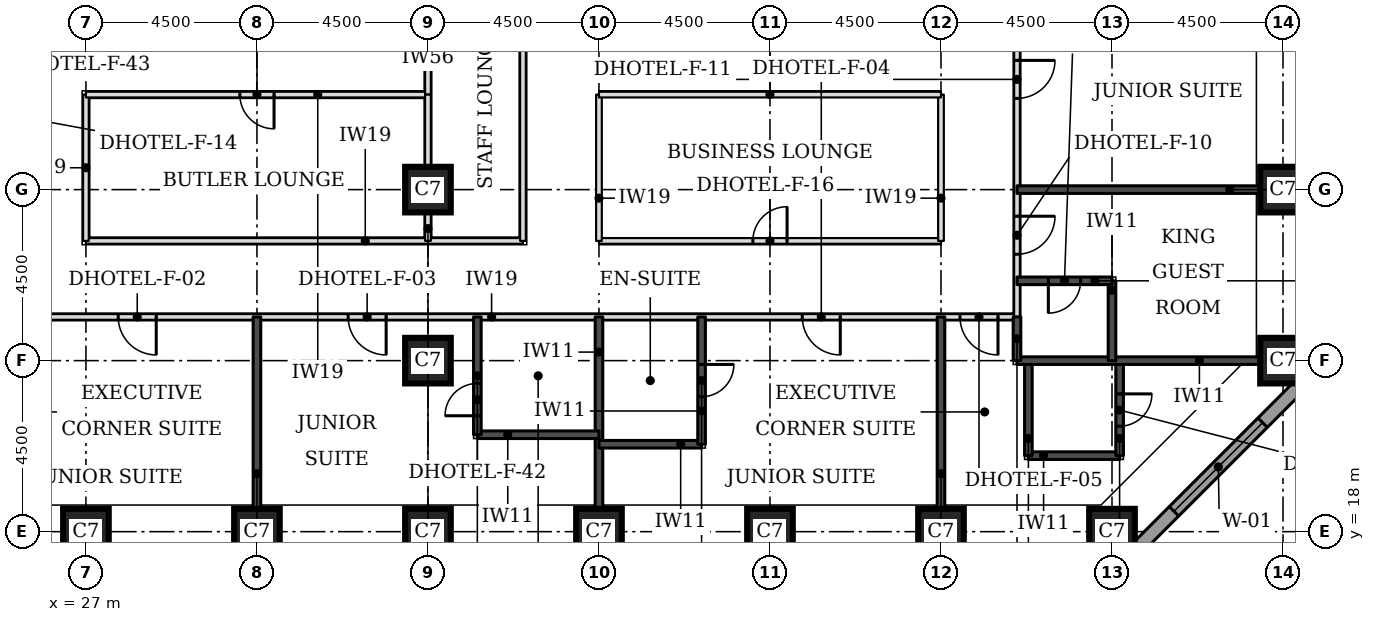
"""IFC4 building model, lengths in metres.
Left out: names, types, materials, properties, quantities, classifications, styles, units other than length and angle.
Written with IfcOpenShell. Run it as: python <this file> out.ifc"""

import sys

from ifc_helpers import new_model, si_unit, direction, frame, frame_2d, origin, origin_2d, place, context, subcontext, project, spatial, rectangle, extrude, element, fill, save


model = new_model("IFC4")
c1 = context("Model", 3, precision=1e-05, world=origin(), true_north=direction((0.0, 1.0)))
c2 = subcontext(c1, "Body", "Model", "MODEL_VIEW")
j1 = project(units=[si_unit("LENGTHUNIT", "METRE"), si_unit("PLANEANGLEUNIT", "RADIAN")], contexts=[c1])
p1 = place(None, origin())
s1 = spatial("IfcSite", under=j1, at=p1, CompositionType="ELEMENT")
p2 = place(p1, origin())
s2 = spatial("IfcBuilding", under=s1, at=p2, CompositionType="ELEMENT")
p3 = place(p2, frame((0.0, 0.0, 42.9)))
s3 = spatial("IfcBuildingStorey", under=s2, at=p3, CompositionType="ELEMENT", Elevation=42.9)
for number, where, z_axis, x_axis in (
    (1, (27.0, 18.0, 0.0), (0.0, 0.0, 1.0), (1.0, 0.0, 0.0)),
    (2, (31.5, 18.0, 0.0), (0.0, 0.0, 1.0), (1.0, 0.0, 0.0)),
    (3, (36.0, 18.0, 0.0), (0.0, 0.0, 1.0), (1.0, 0.0, 0.0)),
    (4, (40.5, 18.0, 0.0), (0.0, 0.0, 1.0), (1.0, 0.0, 0.0)),
    (5, (45.0, 18.0, 0.0), (0.0, 0.0, 1.0), (1.0, 0.0, 0.0)),
    (6, (49.5, 18.0, 0.0), (0.0, 0.0, 1.0), (1.0, 0.0, 0.0)),
    (7, (54.0, 18.0, 0.0), (0.0, 0.0, 1.0), (1.0, 0.0, 0.0)),
    (8, (36.0, 22.5, 0.0), (0.0, 0.0, 1.0), (1.0, 0.0, 0.0)),
    (9, (58.5, 22.5, 0.0), (0.0, 0.0, 1.0), (1.0, 0.0, 0.0)),
    (10, (36.0, 27.0, 0.0), (0.0, 0.0, 1.0), (1.0, 0.0, 0.0)),
    (11, (58.5, 27.0, 0.0), (0.0, 0.0, 1.0), (1.0, 0.0, 0.0)),
):
    element("IfcColumn", number, at=place(p3, frame(where, z_axis=z_axis, x_axis=x_axis)), inside=s3, PredefinedType="COLUMN", context=c2, shape_type="SweptSolid", body=[
        extrude(rectangle(XDim=1.2, YDim=1.2, at=origin_2d()), origin(), (0.0, 0.0, 1.0), 3.3),
    ])
p4 = place(p3, frame((54.27, 17.174, 0.0), z_axis=(0.0, 0.0, 1.0), x_axis=(0.707106781187, 0.707106781187, 0.0)))
e12 = element("IfcWall", 12, at=p4, inside=s3, PredefinedType="STANDARD", context=c2, shape_type="SweptSolid", body=[
    extrude(rectangle(XDim=7.151, YDim=0.35, at=frame_2d((3.576, 0.0))), origin(), (0.0, 0.0, 1.0), 3.055),
])
p5 = place(p4, frame((1.926, 0.0, 0.8)))
e13 = element("IfcOpeningElement", 13, at=p5, cuts=e12, PredefinedType="OPENING", context=c2, shape_type="SweptSolid", body=[
    extrude(rectangle(XDim=3.3, YDim=1.5, at=frame_2d((1.65, 0.75))), frame((0.0, 0.185, 0.0), z_axis=(0.0, -1.0, 0.0), x_axis=(1.0, 0.0, 0.0)), (0.0, 0.0, 1.0), 0.37),
])
p6 = place(p3, frame((20.65, 23.65, 0.0), z_axis=(0.0, 0.0, 1.0), x_axis=(1.0, 0.0, 0.0)))
e14 = element("IfcWall", 14, at=p6, inside=s3, PredefinedType="PARTITIONING", context=c2, shape_type="SweptSolid", body=[
    extrude(rectangle(XDim=30.85, YDim=0.15, at=frame_2d((15.425, 0.0))), origin(), (0.0, 0.0, 1.0), 3.08),
])
p7 = place(p6, frame((7.2, 0.0, 0.0)))
e15 = element("IfcOpeningElement", 15, at=p7, cuts=e14, PredefinedType="OPENING", context=c2, shape_type="SweptSolid", body=[
    extrude(rectangle(XDim=1.0, YDim=2.1, at=frame_2d((0.5, 1.05))), frame((0.0, 0.085, 0.0), z_axis=(0.0, -1.0, 0.0), x_axis=(1.0, 0.0, 0.0)), (0.0, 0.0, 1.0), 0.17),
])
p8 = place(p6, frame((13.25, 0.0, 0.0)))
e16 = element("IfcOpeningElement", 16, at=p8, cuts=e14, PredefinedType="OPENING", context=c2, shape_type="SweptSolid", body=[
    extrude(rectangle(XDim=1.0, YDim=2.1, at=frame_2d((0.5, 1.05))), frame((0.0, 0.085, 0.0), z_axis=(0.0, -1.0, 0.0), x_axis=(1.0, 0.0, 0.0)), (0.0, 0.0, 1.0), 0.17),
])
p9 = place(p6, frame((25.2, 0.0, 0.0)))
e17 = element("IfcOpeningElement", 17, at=p9, cuts=e14, PredefinedType="OPENING", context=c2, shape_type="SweptSolid", body=[
    extrude(rectangle(XDim=1.0, YDim=2.1, at=frame_2d((0.5, 1.05))), frame((0.0, 0.085, 0.0), z_axis=(0.0, -1.0, 0.0), x_axis=(1.0, 0.0, 0.0)), (0.0, 0.0, 1.0), 0.17),
])
p10 = place(p6, frame((0.425, 0.0, 0.0)))
e18 = element("IfcOpeningElement", 18, at=p10, cuts=e14, PredefinedType="OPENING", context=c2, shape_type="SweptSolid", body=[
    extrude(rectangle(XDim=1.0, YDim=2.1, at=frame_2d((0.5, 1.05))), frame((0.0, 0.085, 0.0), z_axis=(0.0, -1.0, 0.0), x_axis=(1.0, 0.0, 0.0)), (0.0, 0.0, 1.0), 0.17),
])
p11 = place(p6, frame((29.35, 0.0, 0.0)))
e19 = element("IfcOpeningElement", 19, at=p11, cuts=e14, PredefinedType="OPENING", context=c2, shape_type="SweptSolid", body=[
    extrude(rectangle(XDim=1.0, YDim=2.1, at=frame_2d((0.5, 1.05))), frame((0.0, 0.085, 0.0), z_axis=(0.0, -1.0, 0.0), x_axis=(1.0, 0.0, 0.0)), (0.0, 0.0, 1.0), 0.17),
])
p12 = place(p3, frame((51.5, 23.65, 0.0), z_axis=(0.0, 0.0, 1.0), x_axis=(0.0, 1.0, 0.0)))
e20 = element("IfcWall", 20, at=p12, inside=s3, PredefinedType="PARTITIONING", context=c2, shape_type="SweptSolid", body=[
    extrude(rectangle(XDim=23.85, YDim=0.15, at=frame_2d((11.925, 0.0))), origin(), (0.0, 0.0, 1.0), 3.08),
])
p13 = place(p12, frame((1.65, 0.0, 0.0)))
e21 = element("IfcOpeningElement", 21, at=p13, cuts=e20, PredefinedType="OPENING", context=c2, shape_type="SweptSolid", body=[
    extrude(rectangle(XDim=1.0, YDim=2.1, at=frame_2d((0.5, 1.05))), frame((0.0, 0.085, 0.0), z_axis=(0.0, -1.0, 0.0), x_axis=(1.0, 0.0, 0.0)), (0.0, 0.0, 1.0), 0.17),
])
p14 = place(p12, frame((5.75, 0.0, 0.0)))
e22 = element("IfcOpeningElement", 22, at=p14, cuts=e20, PredefinedType="OPENING", context=c2, shape_type="SweptSolid", body=[
    extrude(rectangle(XDim=1.0, YDim=2.1, at=frame_2d((0.5, 1.05))), frame((0.0, 0.085, 0.0), z_axis=(0.0, -1.0, 0.0), x_axis=(1.0, 0.0, 0.0)), (0.0, 0.0, 1.0), 0.17),
])
p15 = place(p12, frame((15.15, 0.0, 0.0)))
e23 = element("IfcOpeningElement", 23, at=p15, cuts=e20, PredefinedType="OPENING", context=c2, shape_type="SweptSolid", body=[
    extrude(rectangle(XDim=1.0, YDim=2.1, at=frame_2d((0.5, 1.05))), frame((0.0, 0.085, 0.0), z_axis=(0.0, -1.0, 0.0), x_axis=(1.0, 0.0, 0.0)), (0.0, 0.0, 1.0), 0.17),
])
p16 = place(p12, frame((19.9, 0.0, 0.0)))
e24 = element("IfcOpeningElement", 24, at=p16, cuts=e20, PredefinedType="OPENING", context=c2, shape_type="SweptSolid", body=[
    extrude(rectangle(XDim=0.9, YDim=2.1, at=frame_2d((0.45, 1.05))), frame((0.0, 0.085, 0.0), z_axis=(0.0, -1.0, 0.0), x_axis=(1.0, 0.0, 0.0)), (0.0, 0.0, 1.0), 0.17),
])
p17 = place(p3, frame((27.0, 25.65, 0.0), z_axis=(0.0, 0.0, 1.0), x_axis=(1.0, 0.0, 0.0)))
e25 = element("IfcWall", 25, at=p17, inside=s3, PredefinedType="PARTITIONING", context=c2, shape_type="SweptSolid", body=[
    extrude(rectangle(XDim=11.5, YDim=0.15, at=frame_2d((5.75, 0.0))), origin(), (0.0, 0.0, 1.0), 3.08),
])
p18 = place(p3, frame((27.0, 25.65, 0.0), z_axis=(0.0, 0.0, 1.0), x_axis=(0.0, 1.0, 0.0)))
e26 = element("IfcWall", 26, at=p18, inside=s3, PredefinedType="PARTITIONING", context=c2, shape_type="SweptSolid", body=[
    extrude(rectangle(XDim=3.85, YDim=0.15, at=frame_2d((1.925, 0.0))), origin(), (0.0, 0.0, 1.0), 3.08),
])
p19 = place(p3, frame((38.5, 25.65, 0.0), z_axis=(0.0, 0.0, 1.0), x_axis=(0.0, 1.0, 0.0)))
e27 = element("IfcWall", 27, at=p19, inside=s3, PredefinedType="PARTITIONING", context=c2, shape_type="SweptSolid", body=[
    extrude(rectangle(XDim=14.85, YDim=0.15, at=frame_2d((7.425, 0.0))), origin(), (0.0, 0.0, 1.0), 3.08),
])
p20 = place(p19, frame((6.975, 0.0, 0.0)))
e28 = element("IfcOpeningElement", 28, at=p20, cuts=e27, PredefinedType="OPENING", context=c2, shape_type="SweptSolid", body=[
    extrude(rectangle(XDim=0.9, YDim=2.1, at=frame_2d((0.45, 1.05))), frame((0.0, 0.085, 0.0), z_axis=(0.0, -1.0, 0.0), x_axis=(1.0, 0.0, 0.0)), (0.0, 0.0, 1.0), 0.17),
])
p21 = place(p3, frame((40.5, 25.65, 0.0), z_axis=(0.0, 0.0, 1.0), x_axis=(1.0, 0.0, 0.0)))
e29 = element("IfcWall", 29, at=p21, inside=s3, PredefinedType="PARTITIONING", context=c2, shape_type="SweptSolid", body=[
    extrude(rectangle(XDim=9.0, YDim=0.15, at=frame_2d((4.5, 0.0))), origin(), (0.0, 0.0, 1.0), 3.08),
])
p22 = place(p21, frame((4.05, 0.0, 0.0)))
e30 = element("IfcOpeningElement", 30, at=p22, cuts=e29, PredefinedType="OPENING", context=c2, shape_type="SweptSolid", body=[
    extrude(rectangle(XDim=0.9, YDim=2.1, at=frame_2d((0.45, 1.05))), frame((0.0, 0.085, 0.0), z_axis=(0.0, -1.0, 0.0), x_axis=(1.0, 0.0, 0.0)), (0.0, 0.0, 1.0), 0.17),
])
for number, where, z_axis, x_axis in (
    (31, (40.5, 25.65, 0.0), (0.0, 0.0, 1.0), (0.0, 1.0, 0.0)),
    (32, (49.5, 25.65, 0.0), (0.0, 0.0, 1.0), (0.0, 1.0, 0.0)),
):
    element("IfcWall", number, at=place(p3, frame(where, z_axis=z_axis, x_axis=x_axis)), inside=s3, PredefinedType="PARTITIONING", context=c2, shape_type="SweptSolid", body=[
        extrude(rectangle(XDim=3.85, YDim=0.15, at=frame_2d((1.925, 0.0))), origin(), (0.0, 0.0, 1.0), 3.08),
    ])
p23 = place(p3, frame((27.0, 29.5, 0.0), z_axis=(0.0, 0.0, 1.0), x_axis=(1.0, 0.0, 0.0)))
e33 = element("IfcWall", 33, at=p23, inside=s3, PredefinedType="PARTITIONING", context=c2, shape_type="SweptSolid", body=[
    extrude(rectangle(XDim=9.0, YDim=0.15, at=frame_2d((4.5, 0.0))), origin(), (0.0, 0.0, 1.0), 3.08),
])
p24 = place(p23, frame((4.05, 0.0, 0.0)))
e34 = element("IfcOpeningElement", 34, at=p24, cuts=e33, PredefinedType="OPENING", context=c2, shape_type="SweptSolid", body=[
    extrude(rectangle(XDim=0.9, YDim=2.1, at=frame_2d((0.45, 1.05))), frame((0.0, 0.085, 0.0), z_axis=(0.0, -1.0, 0.0), x_axis=(1.0, 0.0, 0.0)), (0.0, 0.0, 1.0), 0.17),
])
p25 = place(p3, frame((36.0, 29.5, 0.0), z_axis=(0.0, 0.0, 1.0), x_axis=(0.0, 1.0, 0.0)))
e35 = element("IfcWall", 35, at=p25, inside=s3, PredefinedType="PARTITIONING", context=c2, shape_type="SweptSolid", body=[
    extrude(rectangle(XDim=1.95, YDim=0.15, at=frame_2d((0.975, 0.0))), origin(), (0.0, 0.0, 1.0), 2.33),
])
p26 = place(p3, frame((40.5, 29.5, 0.0), z_axis=(0.0, 0.0, 1.0), x_axis=(1.0, 0.0, 0.0)))
e36 = element("IfcWall", 36, at=p26, inside=s3, PredefinedType="PARTITIONING", context=c2, shape_type="SweptSolid", body=[
    extrude(rectangle(XDim=9.0, YDim=0.15, at=frame_2d((4.5, 0.0))), origin(), (0.0, 0.0, 1.0), 3.08),
])
for number, where, z_axis, x_axis in (
    (37, (31.5, 18.6, 0.0), (0.0, 0.0, 1.0), (0.0, 1.0, 0.0)),
    (38, (40.5, 18.6, 0.0), (0.0, 0.0, 1.0), (0.0, 1.0, 0.0)),
    (39, (49.5, 18.6, 0.0), (0.0, 0.0, 1.0), (0.0, 1.0, 0.0)),
):
    element("IfcWall", number, at=place(p3, frame(where, z_axis=z_axis, x_axis=x_axis)), inside=s3, PredefinedType="SOLIDWALL", context=c2, shape_type="SweptSolid", body=[
        extrude(rectangle(XDim=5.05, YDim=0.2, at=frame_2d((2.525, 0.0))), origin(), (0.0, 0.0, 1.0), 3.08),
    ])
p27 = place(p3, frame((51.8, 20.0, 0.0), z_axis=(0.0, 0.0, 1.0), x_axis=(1.0, 0.0, 0.0)))
e40 = element("IfcWall", 40, at=p27, inside=s3, PredefinedType="SOLIDWALL", context=c2, shape_type="SweptSolid", body=[
    extrude(rectangle(XDim=2.4, YDim=0.2, at=frame_2d((1.2, 0.0))), origin(), (0.0, 0.0, 1.0), 3.08),
])
p28 = place(p3, frame((51.8, 20.0, 0.0), z_axis=(0.0, 0.0, 1.0), x_axis=(0.0, 1.0, 0.0)))
e41 = element("IfcWall", 41, at=p28, inside=s3, PredefinedType="SOLIDWALL", context=c2, shape_type="SweptSolid", body=[
    extrude(rectangle(XDim=2.5, YDim=0.2, at=frame_2d((1.25, 0.0))), origin(), (0.0, 0.0, 1.0), 3.08),
])
p29 = place(p3, frame((54.2, 20.0, 0.0), z_axis=(0.0, 0.0, 1.0), x_axis=(0.0, 1.0, 0.0)))
e42 = element("IfcWall", 42, at=p29, inside=s3, PredefinedType="SOLIDWALL", context=c2, shape_type="SweptSolid", body=[
    extrude(rectangle(XDim=2.5, YDim=0.2, at=frame_2d((1.25, 0.0))), origin(), (0.0, 0.0, 1.0), 3.08),
])
p30 = place(p29, frame((0.775, 0.0, 0.0)))
e43 = element("IfcOpeningElement", 43, at=p30, cuts=e42, PredefinedType="OPENING", context=c2, shape_type="SweptSolid", body=[
    extrude(rectangle(XDim=0.85, YDim=2.1, at=frame_2d((0.425, 1.05))), frame((0.0, 0.11, 0.0), z_axis=(0.0, -1.0, 0.0), x_axis=(1.0, 0.0, 0.0)), (0.0, 0.0, 1.0), 0.22),
])
p31 = place(p3, frame((40.5, 20.3, 0.0), z_axis=(0.0, 0.0, 1.0), x_axis=(1.0, 0.0, 0.0)))
e44 = element("IfcWall", 44, at=p31, inside=s3, PredefinedType="SOLIDWALL", context=c2, shape_type="SweptSolid", body=[
    extrude(rectangle(XDim=2.7, YDim=0.2, at=frame_2d((1.35, 0.0))), origin(), (0.0, 0.0, 1.0), 3.08),
])
p32 = place(p3, frame((43.2, 20.3, 0.0), z_axis=(0.0, 0.0, 1.0), x_axis=(0.0, 1.0, 0.0)))
e45 = element("IfcWall", 45, at=p32, inside=s3, PredefinedType="SOLIDWALL", context=c2, shape_type="SweptSolid", body=[
    extrude(rectangle(XDim=3.35, YDim=0.2, at=frame_2d((1.675, 0.0))), origin(), (0.0, 0.0, 1.0), 3.08),
])
p33 = place(p32, frame((1.25, 0.0, 0.0)))
e46 = element("IfcOpeningElement", 46, at=p33, cuts=e45, PredefinedType="OPENING", context=c2, shape_type="SweptSolid", body=[
    extrude(rectangle(XDim=0.85, YDim=2.1, at=frame_2d((0.425, 1.05))), frame((0.0, 0.11, 0.0), z_axis=(0.0, -1.0, 0.0), x_axis=(1.0, 0.0, 0.0)), (0.0, 0.0, 1.0), 0.22),
])
p34 = place(p3, frame((37.3, 20.55, 0.0), z_axis=(0.0, 0.0, 1.0), x_axis=(1.0, 0.0, 0.0)))
e47 = element("IfcWall", 47, at=p34, inside=s3, PredefinedType="SOLIDWALL", context=c2, shape_type="SweptSolid", body=[
    extrude(rectangle(XDim=3.2, YDim=0.2, at=frame_2d((1.6, 0.0))), origin(), (0.0, 0.0, 1.0), 3.08),
])
p35 = place(p3, frame((37.3, 20.55, 0.0), z_axis=(0.0, 0.0, 1.0), x_axis=(0.0, 1.0, 0.0)))
e48 = element("IfcWall", 48, at=p35, inside=s3, PredefinedType="SOLIDWALL", context=c2, shape_type="SweptSolid", body=[
    extrude(rectangle(XDim=3.1, YDim=0.2, at=frame_2d((1.55, 0.0))), origin(), (0.0, 0.0, 1.0), 3.08),
])
p36 = place(p35, frame((0.5, 0.0, 0.0)))
e49 = element("IfcOpeningElement", 49, at=p36, cuts=e48, PredefinedType="OPENING", context=c2, shape_type="SweptSolid", body=[
    extrude(rectangle(XDim=0.85, YDim=2.1, at=frame_2d((0.425, 1.05))), frame((0.0, 0.11, 0.0), z_axis=(0.0, -1.0, 0.0), x_axis=(1.0, 0.0, 0.0)), (0.0, 0.0, 1.0), 0.22),
])
p37 = place(p3, frame((51.5, 22.5, 0.0), z_axis=(0.0, 0.0, 1.0), x_axis=(1.0, 0.0, 0.0)))
e50 = element("IfcWall", 50, at=p37, inside=s3, PredefinedType="SOLIDWALL", context=c2, shape_type="SweptSolid", body=[
    extrude(rectangle(XDim=6.4, YDim=0.2, at=frame_2d((3.2, 0.0))), origin(), (0.0, 0.0, 1.0), 3.08),
])
p38 = place(p3, frame((51.5, 22.5, 0.0), z_axis=(0.0, 0.0, 1.0), x_axis=(0.0, 1.0, 0.0)))
e51 = element("IfcWall", 51, at=p38, inside=s3, PredefinedType="SOLIDWALL", context=c2, shape_type="SweptSolid", body=[
    extrude(rectangle(XDim=1.15, YDim=0.2, at=frame_2d((0.575, 0.0))), origin(), (0.0, 0.0, 1.0), 3.08),
])
p39 = place(p3, frame((54.0, 22.5, 0.0), z_axis=(0.0, 0.0, 1.0), x_axis=(0.0, 1.0, 0.0)))
e52 = element("IfcWall", 52, at=p39, inside=s3, PredefinedType="SOLIDWALL", context=c2, shape_type="SweptSolid", body=[
    extrude(rectangle(XDim=2.1, YDim=0.2, at=frame_2d((1.05, 0.0))), origin(), (0.0, 0.0, 1.0), 3.08),
])
p40 = place(p3, frame((51.5, 24.6, 0.0), z_axis=(0.0, 0.0, 1.0), x_axis=(1.0, 0.0, 0.0)))
e53 = element("IfcWall", 53, at=p40, inside=s3, PredefinedType="SOLIDWALL", context=c2, shape_type="SweptSolid", body=[
    extrude(rectangle(XDim=2.5, YDim=0.2, at=frame_2d((1.25, 0.0))), origin(), (0.0, 0.0, 1.0), 3.08),
])
p41 = place(p40, frame((0.825, 0.0, 0.0)))
e54 = element("IfcOpeningElement", 54, at=p41, cuts=e53, PredefinedType="OPENING", context=c2, shape_type="SweptSolid", body=[
    extrude(rectangle(XDim=0.85, YDim=2.1, at=frame_2d((0.425, 1.05))), frame((0.0, 0.11, 0.0), z_axis=(0.0, -1.0, 0.0), x_axis=(1.0, 0.0, 0.0)), (0.0, 0.0, 1.0), 0.22),
])
p42 = place(p3, frame((51.5, 27.0, 0.0), z_axis=(0.0, 0.0, 1.0), x_axis=(1.0, 0.0, 0.0)))
e55 = element("IfcWall", 55, at=p42, inside=s3, PredefinedType="SOLIDWALL", context=c2, shape_type="SweptSolid", body=[
    extrude(rectangle(XDim=6.4, YDim=0.2, at=frame_2d((3.2, 0.0))), origin(), (0.0, 0.0, 1.0), 3.08),
])
p43 = place(p3, frame((36.0, 25.65, 0.0), z_axis=(0.0, 0.0, 1.0), x_axis=(0.0, 1.0, 0.0)))
e56 = element("IfcWall", 56, at=p43, inside=s3, PredefinedType="PARTITIONING", context=c2, shape_type="SweptSolid", body=[
    extrude(rectangle(XDim=3.85, YDim=0.15, at=frame_2d((1.925, 0.0))), origin(), (0.0, 0.0, 1.0), 2.33),
])
p44 = place(p5, origin())
e57 = element("IfcWindow", 57, at=p44, inside=s3, PartitioningType="SINGLE_PANEL", PredefinedType="WINDOW", context=c2, shape_type="SweptSolid", body=[
    extrude(rectangle(XDim=3.3, YDim=1.5, at=frame_2d((1.65, 0.75))), frame((0.0, 0.085, 0.0), z_axis=(0.0, -1.0, 0.0), x_axis=(1.0, 0.0, 0.0)), (0.0, 0.0, 1.0), 0.06),
])
fill(e13, e57)
p45 = place(p7, frame((1.0, 0.0, 0.0), z_axis=(0.0, 0.0, 1.0), x_axis=(-1.0, 0.0, 0.0)))
e58 = element("IfcDoor", 58, at=p45, inside=s3, OperationType="SINGLE_SWING_LEFT", PredefinedType="DOOR", context=c2, shape_type="SweptSolid", body=[
    extrude(rectangle(XDim=1.0, YDim=2.1, at=frame_2d((0.5, 1.05))), frame((0.0, 0.025, 0.0), z_axis=(0.0, -1.0, 0.0), x_axis=(1.0, 0.0, 0.0)), (0.0, 0.0, 1.0), 0.05),
])
fill(e15, e58)
p46 = place(p8, frame((1.0, 0.0, 0.0), z_axis=(0.0, 0.0, 1.0), x_axis=(-1.0, 0.0, 0.0)))
e59 = element("IfcDoor", 59, at=p46, inside=s3, OperationType="SINGLE_SWING_LEFT", PredefinedType="DOOR", context=c2, shape_type="SweptSolid", body=[
    extrude(rectangle(XDim=1.0, YDim=2.1, at=frame_2d((0.5, 1.05))), frame((0.0, 0.025, 0.0), z_axis=(0.0, -1.0, 0.0), x_axis=(1.0, 0.0, 0.0)), (0.0, 0.0, 1.0), 0.05),
])
fill(e16, e59)
p47 = place(p36, origin())
e60 = element("IfcDoor", 60, at=p47, inside=s3, OperationType="SINGLE_SWING_LEFT", PredefinedType="DOOR", context=c2, shape_type="SweptSolid", body=[
    extrude(rectangle(XDim=0.85, YDim=2.1, at=frame_2d((0.425, 1.05))), frame((0.0, 0.025, 0.0), z_axis=(0.0, -1.0, 0.0), x_axis=(1.0, 0.0, 0.0)), (0.0, 0.0, 1.0), 0.05),
])
fill(e49, e60)
p48 = place(p9, frame((1.0, 0.0, 0.0), z_axis=(0.0, 0.0, 1.0), x_axis=(-1.0, 0.0, 0.0)))
e61 = element("IfcDoor", 61, at=p48, inside=s3, OperationType="SINGLE_SWING_LEFT", PredefinedType="DOOR", context=c2, shape_type="SweptSolid", body=[
    extrude(rectangle(XDim=1.0, YDim=2.1, at=frame_2d((0.5, 1.05))), frame((0.0, 0.025, 0.0), z_axis=(0.0, -1.0, 0.0), x_axis=(1.0, 0.0, 0.0)), (0.0, 0.0, 1.0), 0.05),
])
fill(e17, e61)
p49 = place(p33, frame((0.85, 0.0, 0.0), z_axis=(0.0, 0.0, 1.0), x_axis=(-1.0, 0.0, 0.0)))
e62 = element("IfcDoor", 62, at=p49, inside=s3, OperationType="SINGLE_SWING_LEFT", PredefinedType="DOOR", context=c2, shape_type="SweptSolid", body=[
    extrude(rectangle(XDim=0.85, YDim=2.1, at=frame_2d((0.425, 1.05))), frame((0.0, 0.025, 0.0), z_axis=(0.0, -1.0, 0.0), x_axis=(1.0, 0.0, 0.0)), (0.0, 0.0, 1.0), 0.05),
])
fill(e46, e62)
p50 = place(p13, frame((1.0, 0.0, 0.0), z_axis=(0.0, 0.0, 1.0), x_axis=(-1.0, 0.0, 0.0)))
e63 = element("IfcDoor", 63, at=p50, inside=s3, OperationType="SINGLE_SWING_LEFT", PredefinedType="DOOR", context=c2, shape_type="SweptSolid", body=[
    extrude(rectangle(XDim=1.0, YDim=2.1, at=frame_2d((0.5, 1.05))), frame((0.0, 0.025, 0.0), z_axis=(0.0, -1.0, 0.0), x_axis=(1.0, 0.0, 0.0)), (0.0, 0.0, 1.0), 0.05),
])
fill(e21, e63)
p51 = place(p41, frame((0.85, 0.0, 0.0), z_axis=(0.0, 0.0, 1.0), x_axis=(-1.0, 0.0, 0.0)))
e64 = element("IfcDoor", 64, at=p51, inside=s3, OperationType="SINGLE_SWING_RIGHT", PredefinedType="DOOR", context=c2, shape_type="SweptSolid", body=[
    extrude(rectangle(XDim=0.85, YDim=2.1, at=frame_2d((0.425, 1.05))), frame((0.0, 0.025, 0.0), z_axis=(0.0, -1.0, 0.0), x_axis=(1.0, 0.0, 0.0)), (0.0, 0.0, 1.0), 0.05),
])
fill(e54, e64)
p52 = place(p14, frame((1.0, 0.0, 0.0), z_axis=(0.0, 0.0, 1.0), x_axis=(-1.0, 0.0, 0.0)))
e65 = element("IfcDoor", 65, at=p52, inside=s3, OperationType="SINGLE_SWING_LEFT", PredefinedType="DOOR", context=c2, shape_type="SweptSolid", body=[
    extrude(rectangle(XDim=1.0, YDim=2.1, at=frame_2d((0.5, 1.05))), frame((0.0, 0.025, 0.0), z_axis=(0.0, -1.0, 0.0), x_axis=(1.0, 0.0, 0.0)), (0.0, 0.0, 1.0), 0.05),
])
fill(e22, e65)
p53 = place(p11, frame((1.0, 0.0, 0.0), z_axis=(0.0, 0.0, 1.0), x_axis=(-1.0, 0.0, 0.0)))
e66 = element("IfcDoor", 66, at=p53, inside=s3, OperationType="SINGLE_SWING_LEFT", PredefinedType="DOOR", context=c2, shape_type="SweptSolid", body=[
    extrude(rectangle(XDim=1.0, YDim=2.1, at=frame_2d((0.5, 1.05))), frame((0.0, 0.025, 0.0), z_axis=(0.0, -1.0, 0.0), x_axis=(1.0, 0.0, 0.0)), (0.0, 0.0, 1.0), 0.05),
])
fill(e19, e66)
p54 = place(p30, frame((0.85, 0.0, 0.0), z_axis=(0.0, 0.0, 1.0), x_axis=(-1.0, 0.0, 0.0)))
e67 = element("IfcDoor", 67, at=p54, inside=s3, OperationType="SINGLE_SWING_LEFT", PredefinedType="DOOR", context=c2, shape_type="SweptSolid", body=[
    extrude(rectangle(XDim=0.85, YDim=2.1, at=frame_2d((0.425, 1.05))), frame((0.0, 0.025, 0.0), z_axis=(0.0, -1.0, 0.0), x_axis=(1.0, 0.0, 0.0)), (0.0, 0.0, 1.0), 0.05),
])
fill(e43, e67)
p55 = place(p24, frame((0.9, 0.0, 0.0), z_axis=(0.0, 0.0, 1.0), x_axis=(-1.0, 0.0, 0.0)))
e68 = element("IfcDoor", 68, at=p55, inside=s3, OperationType="SINGLE_SWING_LEFT", PredefinedType="DOOR", context=c2, shape_type="SweptSolid", body=[
    extrude(rectangle(XDim=0.9, YDim=2.1, at=frame_2d((0.45, 1.05))), frame((0.0, 0.025, 0.0), z_axis=(0.0, -1.0, 0.0), x_axis=(1.0, 0.0, 0.0)), (0.0, 0.0, 1.0), 0.05),
])
fill(e34, e68)
p56 = place(p22, origin())
e69 = element("IfcDoor", 69, at=p56, inside=s3, OperationType="SINGLE_SWING_RIGHT", PredefinedType="DOOR", context=c2, shape_type="SweptSolid", body=[
    extrude(rectangle(XDim=0.9, YDim=2.1, at=frame_2d((0.45, 1.05))), frame((0.0, 0.025, 0.0), z_axis=(0.0, -1.0, 0.0), x_axis=(1.0, 0.0, 0.0)), (0.0, 0.0, 1.0), 0.05),
])
fill(e30, e69)
save(model, sys.argv[1])
